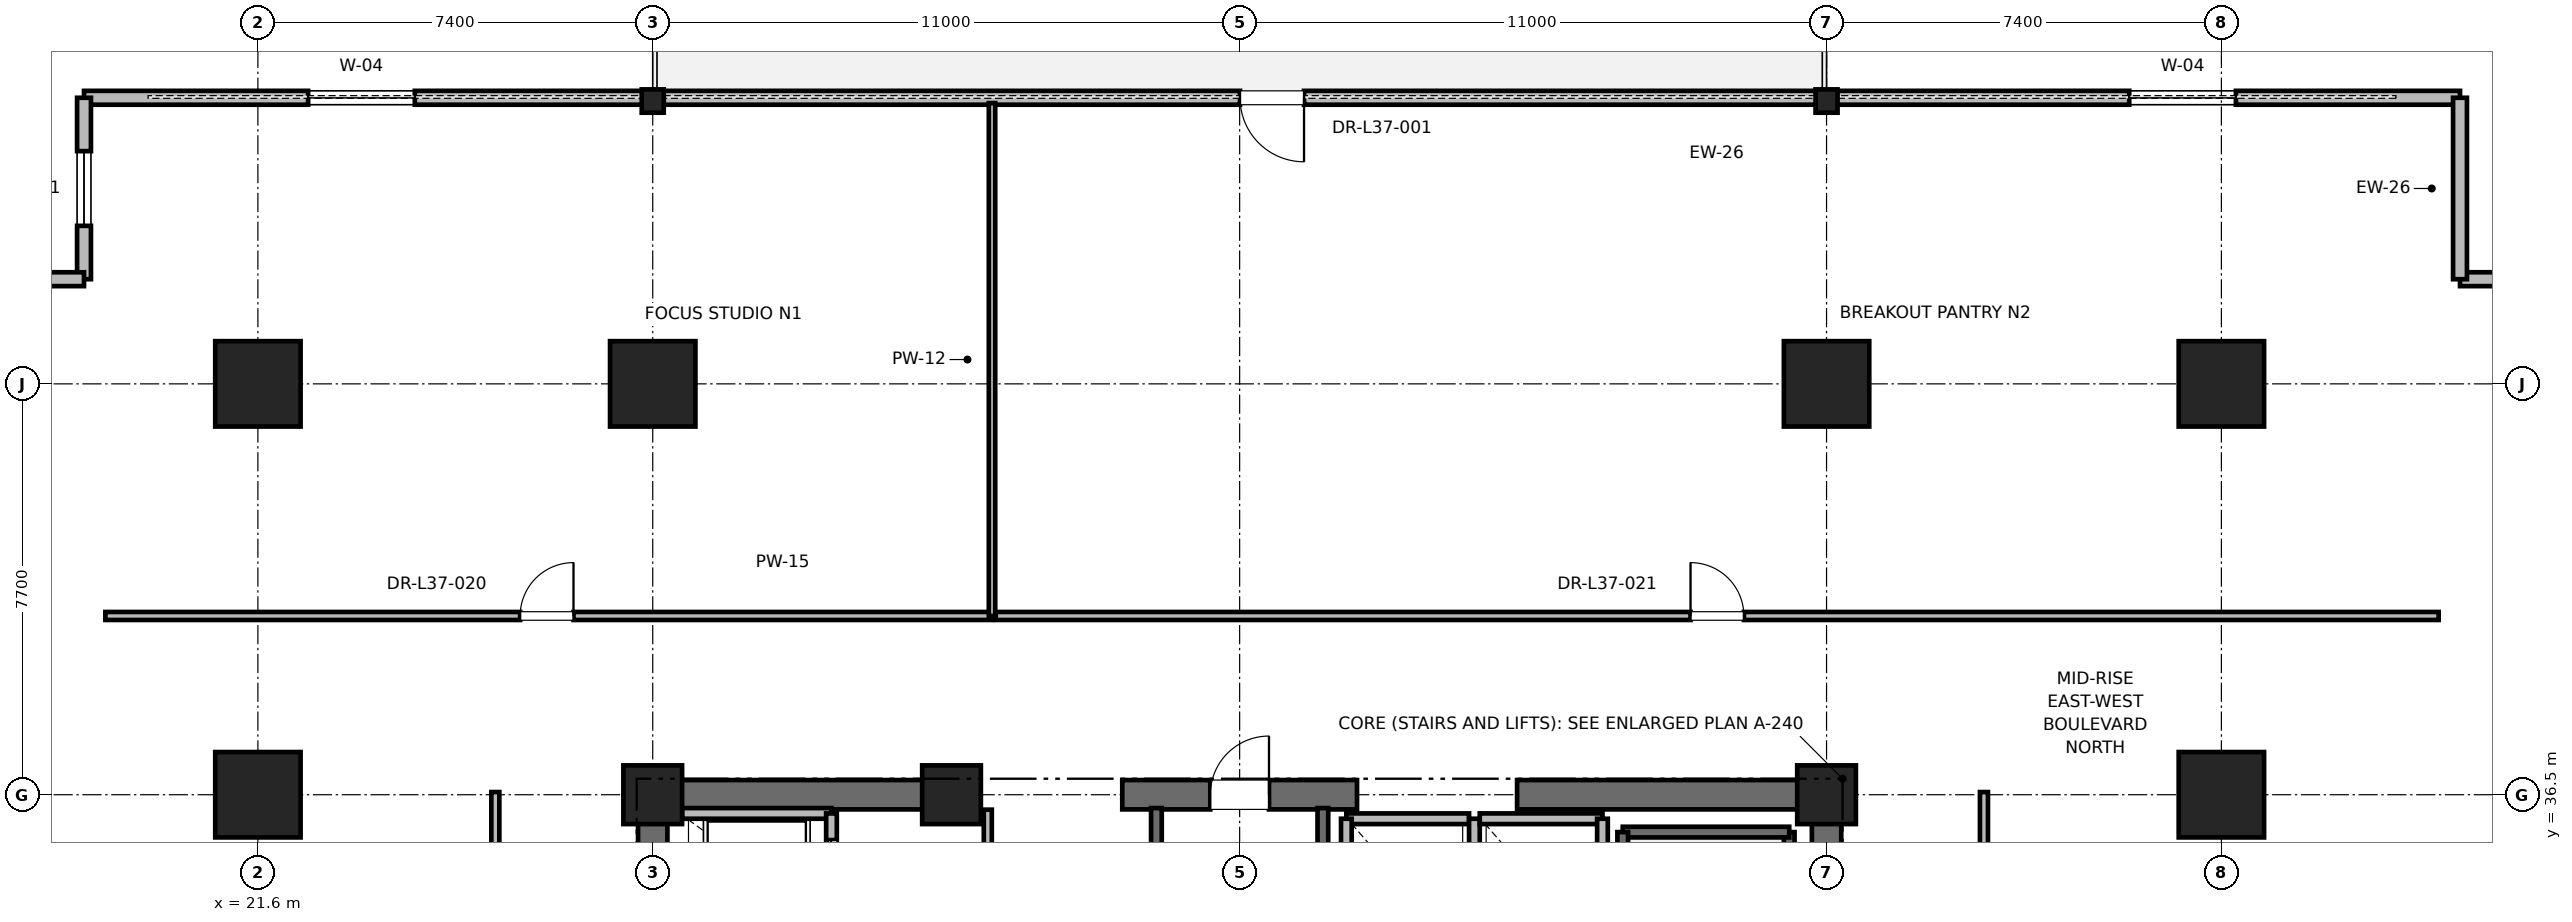
"""IFC4 building model, lengths in metres.
Left out: names, types, materials, properties, quantities, classifications, styles, units other than length and angle.
Written with IfcOpenShell. Run it as: python <this file> out.ifc"""

import sys

from ifc_helpers import new_model, si_unit, direction, frame, frame_2d, origin, origin_2d, place, context, subcontext, project, spatial, rectangle, i_section, extrude, element, fill, save


model = new_model("IFC4")
c1 = context("Model", 3, precision=1e-05, world=origin(), true_north=direction((0.0, 1.0)))
c2 = subcontext(c1, "Body", "Model", "MODEL_VIEW")
j1 = project(units=[si_unit("LENGTHUNIT", "METRE"), si_unit("PLANEANGLEUNIT", "RADIAN")], contexts=[c1])
p1 = place(None, origin())
s1 = spatial("IfcSite", under=j1, at=p1, CompositionType="ELEMENT")
p2 = place(p1, origin())
s2 = spatial("IfcBuilding", under=s1, at=p2, CompositionType="ELEMENT")
p3 = place(p2, frame((0.0, 0.0, 160.4)))
s3 = spatial("IfcBuildingStorey", under=s2, at=p3, CompositionType="ELEMENT", Elevation=160.4)
for number, where, z_axis, x_axis in (
    (1, (29.0, 44.2, 0.0), (0.0, 0.0, 1.0), (1.0, 0.0, 0.0)),
    (2, (51.0, 44.2, 0.0), (0.0, 0.0, 1.0), (1.0, 0.0, 0.0)),
    (3, (21.6, 36.5, 0.0), (0.0, 0.0, 1.0), (1.0, 0.0, 0.0)),
    (4, (58.4, 36.5, 0.0), (0.0, 0.0, 1.0), (1.0, 0.0, 0.0)),
    (5, (21.6, 44.2, 0.0), (0.0, 0.0, 1.0), (1.0, 0.0, 0.0)),
    (6, (58.4, 44.2, 0.0), (0.0, 0.0, 1.0), (1.0, 0.0, 0.0)),
):
    element("IfcColumn", number, at=place(p3, frame(where, z_axis=z_axis, x_axis=x_axis)), inside=s3, PredefinedType="COLUMN", context=c2, shape_type="SweptSolid", body=[
        extrude(rectangle(XDim=1.6, YDim=1.6, at=origin_2d()), origin(), (0.0, 0.0, 1.0), 4.0),
    ])
for number, where, z_axis, x_axis in (
    (7, (29.0, 49.5, 0.0), (0.0, 0.0, 1.0), (1.0, 0.0, 0.0)),
    (8, (51.0, 49.5, 0.0), (0.0, 0.0, 1.0), (1.0, 0.0, 0.0)),
):
    element("IfcColumn", number, at=place(p3, frame(where, z_axis=z_axis, x_axis=x_axis)), inside=s3, PredefinedType="COLUMN", context=c2, shape_type="SweptSolid", body=[
        extrude(i_section(OverallWidth=0.412, OverallDepth=0.437, WebThickness=0.036, FlangeThickness=0.058, FilletRadius=0.015, at=origin_2d()), origin(), (0.0, 0.0, 1.0), 4.0),
    ])
for number, where, z_axis, x_axis in (
    (9, (29.0, 36.5, 0.0), (0.0, 0.0, 1.0), (1.0, 0.0, 0.0)),
    (10, (51.0, 36.5, 0.0), (0.0, 0.0, 1.0), (1.0, 0.0, 0.0)),
    (11, (34.6, 36.5, 0.0), (0.0, 0.0, 1.0), (1.0, 0.0, 0.0)),
):
    element("IfcColumn", number, at=place(p3, frame(where, z_axis=z_axis, x_axis=x_axis)), inside=s3, PredefinedType="PILASTER", context=c2, shape_type="SweptSolid", body=[
        extrude(rectangle(XDim=1.1, YDim=1.1, at=origin_2d()), origin(), (0.0, 0.0, 1.0), 4.0),
    ])
p4 = place(p3, frame((29.0, 36.5, 0.0), z_axis=(0.0, 0.0, 1.0), x_axis=(1.0, 0.0, 0.0)))
e12 = element("IfcWall", 12, at=p4, inside=s3, PredefinedType="SHEAR", context=c2, shape_type="SweptSolid", body=[
    extrude(rectangle(XDim=5.8, YDim=0.55, at=frame_2d((2.9, 0.0))), origin(), (0.0, 0.0, 1.0), 3.775),
])
p5 = place(p3, frame((37.8, 36.5, 0.0), z_axis=(0.0, 0.0, 1.0), x_axis=(1.0, 0.0, 0.0)))
e13 = element("IfcWall", 13, at=p5, inside=s3, PredefinedType="SHEAR", context=c2, shape_type="SweptSolid", body=[
    extrude(rectangle(XDim=4.4, YDim=0.55, at=frame_2d((2.2, 0.0))), origin(), (0.0, 0.0, 1.0), 3.775),
])
p6 = place(p5, frame((1.65, 0.0, 0.0)))
e14 = element("IfcOpeningElement", 14, at=p6, cuts=e13, PredefinedType="OPENING", context=c2, shape_type="SweptSolid", body=[
    extrude(rectangle(XDim=1.1, YDim=2.15, at=frame_2d((0.55, 1.075))), frame((0.0, 0.275, 0.0), z_axis=(0.0, -1.0, 0.0), x_axis=(1.0, 0.0, 0.0)), (0.0, 0.0, 1.0), 0.55),
])
for number, where, z_axis, x_axis in (
    (15, (45.2, 36.5, 0.0), (0.0, 0.0, 1.0), (1.0, 0.0, 0.0)),
    (16, (29.0, 30.7, 0.0), (0.0, 0.0, 1.0), (0.0, 1.0, 0.0)),
):
    element("IfcWall", number, at=place(p3, frame(where, z_axis=z_axis, x_axis=x_axis)), inside=s3, PredefinedType="SHEAR", context=c2, shape_type="SweptSolid", body=[
        extrude(rectangle(XDim=5.8, YDim=0.55, at=frame_2d((2.9, 0.0))), origin(), (0.0, 0.0, 1.0), 3.775),
    ])
p7 = place(p3, frame((51.0, 27.7, 0.0), z_axis=(0.0, 0.0, 1.0), x_axis=(0.0, 1.0, 0.0)))
e17 = element("IfcWall", 17, at=p7, inside=s3, PredefinedType="SHEAR", context=c2, shape_type="SweptSolid", body=[
    extrude(rectangle(XDim=8.8, YDim=0.55, at=frame_2d((4.4, 0.0))), origin(), (0.0, 0.0, 1.0), 3.775),
])
p8 = place(p3, frame((62.872, 49.561, 0.0), z_axis=(0.0, 0.0, 1.0), x_axis=(-1.0, 0.0, 0.0)))
e18 = element("IfcWall", 18, at=p8, inside=s3, PredefinedType="PARAPET", context=c2, shape_type="SweptSolid", body=[
    extrude(rectangle(XDim=44.531, YDim=0.26, at=frame_2d((22.266, 0.0))), origin(), (0.0, 0.0, 1.0), 2.97),
])
p9 = place(p8, frame((4.2, 0.0, 0.85)))
e19 = element("IfcOpeningElement", 19, at=p9, cuts=e18, PredefinedType="OPENING", context=c2, shape_type="SweptSolid", body=[
    extrude(rectangle(XDim=2.0, YDim=2.3, at=frame_2d((1.0, 1.15))), frame((0.0, 0.13, 0.0), z_axis=(0.0, -1.0, 0.0), x_axis=(1.0, 0.0, 0.0)), (0.0, 0.0, 1.0), 0.26),
])
p10 = place(p8, frame((21.666, 0.0, 0.0)))
e20 = element("IfcOpeningElement", 20, at=p10, cuts=e18, PredefinedType="OPENING", context=c2, shape_type="SweptSolid", body=[
    extrude(rectangle(XDim=1.2, YDim=2.2, at=frame_2d((0.6, 1.1))), frame((0.0, 0.13, 0.0), z_axis=(0.0, -1.0, 0.0), x_axis=(1.0, 0.0, 0.0)), (0.0, 0.0, 1.0), 0.26),
])
p11 = place(p8, frame((38.331, 0.0, 0.85)))
e21 = element("IfcOpeningElement", 21, at=p11, cuts=e18, PredefinedType="OPENING", context=c2, shape_type="SweptSolid", body=[
    extrude(rectangle(XDim=2.0, YDim=2.3, at=frame_2d((1.0, 1.15))), frame((0.0, 0.13, 0.0), z_axis=(0.0, -1.0, 0.0), x_axis=(1.0, 0.0, 0.0)), (0.0, 0.0, 1.0), 0.26),
])
p12 = place(p3, frame((66.672, 46.161, 0.0), z_axis=(0.0, 0.0, 1.0), x_axis=(-1.0, 0.0, 0.0)))
e22 = element("IfcWall", 22, at=p12, inside=s3, PredefinedType="PARAPET", context=c2, shape_type="SweptSolid", body=[
    extrude(rectangle(XDim=3.8, YDim=0.26, at=frame_2d((1.9, 0.0))), origin(), (0.0, 0.0, 1.0), 3.775),
])
p13 = place(p12, frame((1.2, 0.0, 0.85)))
e23 = element("IfcOpeningElement", 23, at=p13, cuts=e22, PredefinedType="OPENING", context=c2, shape_type="SweptSolid", body=[
    extrude(rectangle(XDim=1.4, YDim=2.0, at=frame_2d((0.7, 1.0))), frame((0.0, 0.13, 0.0), z_axis=(0.0, -1.0, 0.0), x_axis=(1.0, 0.0, 0.0)), (0.0, 0.0, 1.0), 0.26),
])
p14 = place(p3, frame((62.872, 46.161, 0.0), z_axis=(0.0, 0.0, 1.0), x_axis=(0.0, 1.0, 0.0)))
e24 = element("IfcWall", 24, at=p14, inside=s3, PredefinedType="PARAPET", context=c2, shape_type="SweptSolid", body=[
    extrude(rectangle(XDim=3.4, YDim=0.26, at=frame_2d((1.7, 0.0))), origin(), (0.0, 0.0, 1.0), 3.775),
])
p15 = place(p3, frame((18.341, 49.561, 0.0), z_axis=(0.0, 0.0, 1.0), x_axis=(0.0, -1.0, 0.0)))
e25 = element("IfcWall", 25, at=p15, inside=s3, PredefinedType="PARAPET", context=c2, shape_type="SweptSolid", body=[
    extrude(rectangle(XDim=3.4, YDim=0.26, at=frame_2d((1.7, 0.0))), origin(), (0.0, 0.0, 1.0), 3.775),
])
p16 = place(p15, frame((1.0, 0.0, 0.85)))
e26 = element("IfcOpeningElement", 26, at=p16, cuts=e25, PredefinedType="OPENING", context=c2, shape_type="SweptSolid", body=[
    extrude(rectangle(XDim=1.4, YDim=2.0, at=frame_2d((0.7, 1.0))), frame((0.0, 0.13, 0.0), z_axis=(0.0, -1.0, 0.0), x_axis=(1.0, 0.0, 0.0)), (0.0, 0.0, 1.0), 0.26),
])
p17 = place(p3, frame((18.341, 46.161, 0.0), z_axis=(0.0, 0.0, 1.0), x_axis=(-1.0, 0.0, 0.0)))
e27 = element("IfcWall", 27, at=p17, inside=s3, PredefinedType="PARAPET", context=c2, shape_type="SweptSolid", body=[
    extrude(rectangle(XDim=3.8, YDim=0.26, at=frame_2d((1.9, 0.0))), origin(), (0.0, 0.0, 1.0), 3.775),
])
p18 = place(p3, frame((50.3, 27.65, 0.0), z_axis=(0.0, 0.0, 1.0), x_axis=(0.0, 1.0, 0.0)))
e28 = element("IfcWall", 28, at=p18, inside=s3, PredefinedType="SOLIDWALL", context=c2, shape_type="SweptSolid", body=[
    extrude(rectangle(XDim=8.15, YDim=0.2, at=frame_2d((4.075, 0.0))), origin(), (0.0, 0.0, 1.0), 3.775),
])
p19 = place(p3, frame((47.18, 35.8, 0.0), z_axis=(0.0, 0.0, 1.0), x_axis=(1.0, 0.0, 0.0)))
e29 = element("IfcWall", 29, at=p19, inside=s3, PredefinedType="SOLIDWALL", context=c2, shape_type="SweptSolid", body=[
    extrude(rectangle(XDim=3.12, YDim=0.2, at=frame_2d((1.56, 0.0))), origin(), (0.0, 0.0, 1.0), 3.775),
])
p20 = place(p3, frame((47.18, 27.62, 0.0), z_axis=(0.0, 0.0, 1.0), x_axis=(0.0, 1.0, 0.0)))
e30 = element("IfcWall", 30, at=p20, inside=s3, PredefinedType="SOLIDWALL", context=c2, shape_type="SweptSolid", body=[
    extrude(rectangle(XDim=8.18, YDim=0.2, at=frame_2d((4.09, 0.0))), origin(), (0.0, 0.0, 1.0), 3.775),
])
p21 = place(p3, frame((38.44, 27.38, 0.0), z_axis=(0.0, 0.0, 1.0), x_axis=(0.0, 1.0, 0.0)))
e31 = element("IfcWall", 31, at=p21, inside=s3, PredefinedType="SOLIDWALL", context=c2, shape_type="SweptSolid", body=[
    extrude(rectangle(XDim=8.87, YDim=0.2, at=frame_2d((4.435, 0.0))), origin(), (0.0, 0.0, 1.0), 3.775),
])
p22 = place(p3, frame((41.56, 27.68, 0.0), z_axis=(0.0, 0.0, 1.0), x_axis=(0.0, 1.0, 0.0)))
e32 = element("IfcWall", 32, at=p22, inside=s3, PredefinedType="SOLIDWALL", context=c2, shape_type="SweptSolid", body=[
    extrude(rectangle(XDim=8.57, YDim=0.2, at=frame_2d((4.285, 0.0))), origin(), (0.0, 0.0, 1.0), 3.775),
])
p23 = place(p3, frame((32.35, 36.15, 0.0), z_axis=(0.0, 0.0, 1.0), x_axis=(-1.0, 0.0, 0.0)))
e33 = element("IfcWall", 33, at=p23, inside=s3, PredefinedType="SOLIDWALL", context=c2, shape_type="SweptSolid", body=[
    extrude(rectangle(XDim=2.8, YDim=0.2, at=frame_2d((1.4, 0.0))), origin(), (0.0, 0.0, 1.0), 2.985),
])
p24 = place(p3, frame((32.35, 34.05, 0.0), z_axis=(0.0, 0.0, 1.0), x_axis=(0.0, 1.0, 0.0)))
e34 = element("IfcWall", 34, at=p24, inside=s3, PredefinedType="SOLIDWALL", context=c2, shape_type="SweptSolid", body=[
    extrude(rectangle(XDim=2.1, YDim=0.2, at=frame_2d((1.05, 0.0))), origin(), (0.0, 0.0, 1.0), 3.775),
])
p25 = place(p24, frame((0.5, 0.0, 0.0)))
e35 = element("IfcOpeningElement", 35, at=p25, cuts=e34, PredefinedType="OPENING", context=c2, shape_type="SweptSolid", body=[
    extrude(rectangle(XDim=1.1, YDim=2.2, at=frame_2d((0.55, 1.1))), frame((0.0, 0.1, 0.0), z_axis=(0.0, -1.0, 0.0), x_axis=(1.0, 0.0, 0.0)), (0.0, 0.0, 1.0), 0.2),
])
p26 = place(p3, frame((44.3, 36.05, 0.0), z_axis=(0.0, 0.0, 1.0), x_axis=(-1.0, 0.0, 0.0)))
e36 = element("IfcWall", 36, at=p26, inside=s3, PredefinedType="SOLIDWALL", context=c2, shape_type="SweptSolid", body=[
    extrude(rectangle(XDim=2.3, YDim=0.2, at=frame_2d((1.15, 0.0))), origin(), (0.0, 0.0, 1.0), 2.755),
])
for number, where, z_axis, x_axis in (
    (37, (42.0, 36.05, 0.0), (0.0, 0.0, 1.0), (0.0, -1.0, 0.0)),
    (38, (44.4, 33.45, 0.0), (0.0, 0.0, 1.0), (0.0, 1.0, 0.0)),
):
    element("IfcWall", number, at=place(p3, frame(where, z_axis=z_axis, x_axis=x_axis)), inside=s3, PredefinedType="SOLIDWALL", context=c2, shape_type="SweptSolid", body=[
        extrude(rectangle(XDim=2.6, YDim=0.2, at=frame_2d((1.3, 0.0))), origin(), (0.0, 0.0, 1.0), 2.755),
    ])
p27 = place(p3, frame((46.8, 36.05, 0.0), z_axis=(0.0, 0.0, 1.0), x_axis=(-1.0, 0.0, 0.0)))
e39 = element("IfcWall", 39, at=p27, inside=s3, PredefinedType="SOLIDWALL", context=c2, shape_type="SweptSolid", body=[
    extrude(rectangle(XDim=2.3, YDim=0.2, at=frame_2d((1.15, 0.0))), origin(), (0.0, 0.0, 1.0), 2.755),
])
p28 = place(p3, frame((46.8, 33.45, 0.0), z_axis=(0.0, 0.0, 1.0), x_axis=(0.0, 1.0, 0.0)))
e40 = element("IfcWall", 40, at=p28, inside=s3, PredefinedType="SOLIDWALL", context=c2, shape_type="SweptSolid", body=[
    extrude(rectangle(XDim=2.6, YDim=0.2, at=frame_2d((1.3, 0.0))), origin(), (0.0, 0.0, 1.0), 3.775),
])
p29 = place(p3, frame((35.28, 33.95, 0.0), z_axis=(0.0, 0.0, 1.0), x_axis=(0.0, 1.0, 0.0)))
e41 = element("IfcWall", 41, at=p29, inside=s3, PredefinedType="PARTITIONING", context=c2, shape_type="SweptSolid", body=[
    extrude(rectangle(XDim=2.27, YDim=0.15, at=frame_2d((1.135, 0.0))), origin(), (0.0, 0.0, 1.0), 2.755),
])
p30 = place(p29, frame((0.66, 0.0, 0.0)))
e42 = element("IfcOpeningElement", 42, at=p30, cuts=e41, PredefinedType="OPENING", context=c2, shape_type="SweptSolid", body=[
    extrude(rectangle(XDim=0.95, YDim=2.15, at=frame_2d((0.475, 1.075))), frame((0.0, 0.075, 0.0), z_axis=(0.0, -1.0, 0.0), x_axis=(1.0, 0.0, 0.0)), (0.0, 0.0, 1.0), 0.15),
])
p31 = place(p3, frame((18.741, 39.85, 0.0), z_axis=(0.0, 0.0, 1.0), x_axis=(1.0, 0.0, 0.0)))
e43 = element("IfcWall", 43, at=p31, inside=s3, PredefinedType="PARTITIONING", context=c2, shape_type="SweptSolid", body=[
    extrude(rectangle(XDim=16.618, YDim=0.15, at=frame_2d((8.309, 0.0))), origin(), (0.0, 0.0, 1.0), 2.85),
])
p32 = place(p31, frame((7.774, 0.0, 0.0)))
e44 = element("IfcOpeningElement", 44, at=p32, cuts=e43, PredefinedType="OPENING", context=c2, shape_type="SweptSolid", body=[
    extrude(rectangle(XDim=1.0, YDim=2.15, at=frame_2d((0.5, 1.075))), frame((0.0, 0.075, 0.0), z_axis=(0.0, -1.0, 0.0), x_axis=(1.0, 0.0, 0.0)), (0.0, 0.0, 1.0), 0.15),
])
p33 = place(p3, frame((35.359, 39.85, 0.0), z_axis=(0.0, 0.0, 1.0), x_axis=(0.0, 1.0, 0.0)))
e45 = element("IfcWall", 45, at=p33, inside=s3, PredefinedType="PARTITIONING", context=c2, shape_type="SweptSolid", body=[
    extrude(rectangle(XDim=9.611, YDim=0.12, at=frame_2d((4.806, 0.0))), origin(), (0.0, 0.0, 1.0), 2.405),
])
p34 = place(p3, frame((35.429, 39.85, 0.0), z_axis=(0.0, 0.0, 1.0), x_axis=(1.0, 0.0, 0.0)))
e46 = element("IfcWall", 46, at=p34, inside=s3, PredefinedType="PARTITIONING", context=c2, shape_type="SweptSolid", body=[
    extrude(rectangle(XDim=27.043, YDim=0.15, at=frame_2d((13.522, 0.0))), origin(), (0.0, 0.0, 1.0), 2.85),
])
p35 = place(p34, frame((13.022, 0.0, 0.0)))
e47 = element("IfcOpeningElement", 47, at=p35, cuts=e46, PredefinedType="OPENING", context=c2, shape_type="SweptSolid", body=[
    extrude(rectangle(XDim=1.0, YDim=2.15, at=frame_2d((0.5, 1.075))), frame((0.0, 0.075, 0.0), z_axis=(0.0, -1.0, 0.0), x_axis=(1.0, 0.0, 0.0)), (0.0, 0.0, 1.0), 0.15),
])
p36 = place(p3, frame((26.05, 31.19, 0.0), z_axis=(0.0, 0.0, 1.0), x_axis=(0.0, 1.0, 0.0)))
e48 = element("IfcWall", 48, at=p36, inside=s3, PredefinedType="PARTITIONING", context=c2, shape_type="SweptSolid", body=[
    extrude(rectangle(XDim=5.36, YDim=0.15, at=frame_2d((2.68, 0.0))), origin(), (0.0, 0.0, 1.0), 2.85),
])
p37 = place(p36, frame((2.105, 0.0, 0.0)))
e49 = element("IfcOpeningElement", 49, at=p37, cuts=e48, PredefinedType="OPENING", context=c2, shape_type="SweptSolid", body=[
    extrude(rectangle(XDim=1.0, YDim=2.15, at=frame_2d((0.5, 1.075))), frame((0.0, 0.075, 0.0), z_axis=(0.0, -1.0, 0.0), x_axis=(1.0, 0.0, 0.0)), (0.0, 0.0, 1.0), 0.15),
])
p38 = place(p3, frame((53.95, 26.122, 0.0), z_axis=(0.0, 0.0, 1.0), x_axis=(0.0, 1.0, 0.0)))
e50 = element("IfcWall", 50, at=p38, inside=s3, PredefinedType="PARTITIONING", context=c2, shape_type="SweptSolid", body=[
    extrude(rectangle(XDim=10.428, YDim=0.15, at=frame_2d((5.214, 0.0))), origin(), (0.0, 0.0, 1.0), 2.85),
])
p39 = place(p38, frame((4.639, 0.0, 0.0)))
e51 = element("IfcOpeningElement", 51, at=p39, cuts=e50, PredefinedType="OPENING", context=c2, shape_type="SweptSolid", body=[
    extrude(rectangle(XDim=1.0, YDim=2.15, at=frame_2d((0.5, 1.075))), frame((0.0, 0.075, 0.0), z_axis=(0.0, -1.0, 0.0), x_axis=(1.0, 0.0, 0.0)), (0.0, 0.0, 1.0), 0.15),
])
p40 = place(p9, origin())
e52 = element("IfcWindow", 52, at=p40, inside=s3, PartitioningType="SINGLE_PANEL", PredefinedType="WINDOW", context=c2, shape_type="SweptSolid", body=[
    extrude(rectangle(XDim=2.0, YDim=2.3, at=frame_2d((1.0, 1.15))), frame((0.0, 0.03, 0.0), z_axis=(0.0, -1.0, 0.0), x_axis=(1.0, 0.0, 0.0)), (0.0, 0.0, 1.0), 0.06),
])
fill(e19, e52)
p41 = place(p10, origin())
e53 = element("IfcDoor", 53, at=p41, inside=s3, OperationType="SINGLE_SWING_LEFT", PredefinedType="DOOR", context=c2, shape_type="SweptSolid", body=[
    extrude(rectangle(XDim=1.2, YDim=2.2, at=frame_2d((0.6, 1.1))), frame((0.0, 0.025, 0.0), z_axis=(0.0, -1.0, 0.0), x_axis=(1.0, 0.0, 0.0)), (0.0, 0.0, 1.0), 0.05),
])
fill(e20, e53)
p42 = place(p11, origin())
e54 = element("IfcWindow", 54, at=p42, inside=s3, PartitioningType="SINGLE_PANEL", PredefinedType="WINDOW", context=c2, shape_type="SweptSolid", body=[
    extrude(rectangle(XDim=2.0, YDim=2.3, at=frame_2d((1.0, 1.15))), frame((0.0, 0.03, 0.0), z_axis=(0.0, -1.0, 0.0), x_axis=(1.0, 0.0, 0.0)), (0.0, 0.0, 1.0), 0.06),
])
fill(e21, e54)
p43 = place(p16, origin())
e55 = element("IfcWindow", 55, at=p43, inside=s3, PartitioningType="SINGLE_PANEL", PredefinedType="WINDOW", context=c2, shape_type="SweptSolid", body=[
    extrude(rectangle(XDim=1.4, YDim=2.0, at=frame_2d((0.7, 1.0))), frame((0.0, 0.03, 0.0), z_axis=(0.0, -1.0, 0.0), x_axis=(1.0, 0.0, 0.0)), (0.0, 0.0, 1.0), 0.06),
])
fill(e26, e55)
p44 = place(p6, origin())
e56 = element("IfcDoor", 56, at=p44, inside=s3, OperationType="SINGLE_SWING_RIGHT", PredefinedType="DOOR", context=c2, shape_type="SweptSolid", body=[
    extrude(rectangle(XDim=1.1, YDim=2.15, at=frame_2d((0.55, 1.075))), frame((0.0, 0.025, 0.0), z_axis=(0.0, -1.0, 0.0), x_axis=(1.0, 0.0, 0.0)), (0.0, 0.0, 1.0), 0.05),
])
fill(e14, e56)
p45 = place(p25, origin())
e57 = element("IfcDoor", 57, at=p45, inside=s3, OperationType="SLIDING_TO_RIGHT", PredefinedType="DOOR", context=c2, shape_type="SweptSolid", body=[
    extrude(rectangle(XDim=1.1, YDim=2.2, at=frame_2d((0.55, 1.1))), frame((0.0, 0.025, 0.0), z_axis=(0.0, -1.0, 0.0), x_axis=(1.0, 0.0, 0.0)), (0.0, 0.0, 1.0), 0.05),
])
fill(e35, e57)
p46 = place(p32, origin())
e58 = element("IfcDoor", 58, at=p46, inside=s3, OperationType="SINGLE_SWING_RIGHT", PredefinedType="DOOR", context=c2, shape_type="SweptSolid", body=[
    extrude(rectangle(XDim=1.0, YDim=2.15, at=frame_2d((0.5, 1.075))), frame((0.0, 0.025, 0.0), z_axis=(0.0, -1.0, 0.0), x_axis=(1.0, 0.0, 0.0)), (0.0, 0.0, 1.0), 0.05),
])
fill(e44, e58)
p47 = place(p35, origin())
e59 = element("IfcDoor", 59, at=p47, inside=s3, OperationType="SINGLE_SWING_LEFT", PredefinedType="DOOR", context=c2, shape_type="SweptSolid", body=[
    extrude(rectangle(XDim=1.0, YDim=2.15, at=frame_2d((0.5, 1.075))), frame((0.0, 0.025, 0.0), z_axis=(0.0, -1.0, 0.0), x_axis=(1.0, 0.0, 0.0)), (0.0, 0.0, 1.0), 0.05),
])
fill(e47, e59)
save(model, sys.argv[1])
